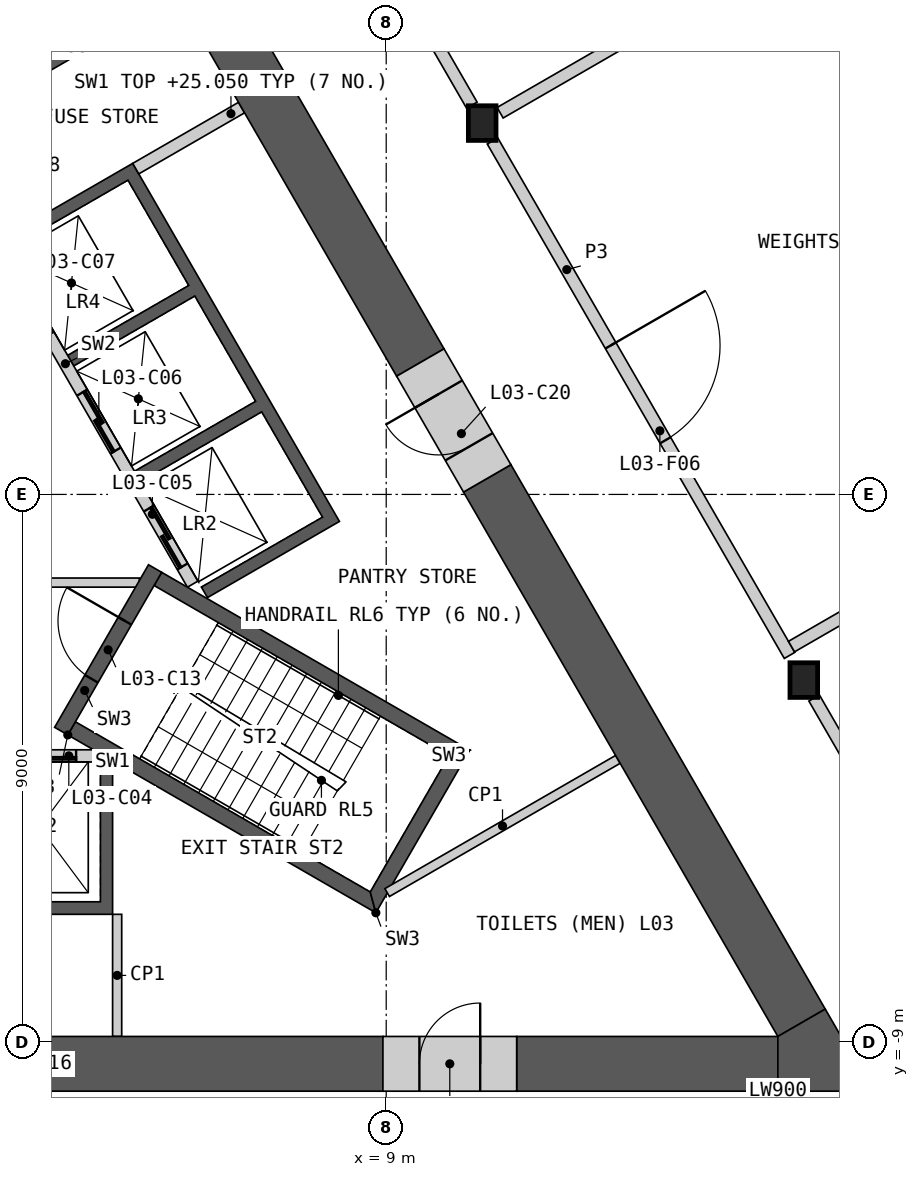
"""IFC4 building model, lengths in metres.
Left out: names, types, materials, properties, quantities, classifications, styles, units other than length and angle.
Written with IfcOpenShell. Run it as: python <this file> out.ifc"""

import sys

from ifc_helpers import new_model, si_unit, direction, frame, frame_2d, origin, origin_2d, place, context, subcontext, project, spatial, polyline, rectangle, i_section, outline, extrude, element, fill, save


model = new_model("IFC4")
c1 = context("Model", 3, precision=1e-05, world=origin(), true_north=direction((0.0, 1.0)))
c2 = subcontext(c1, "Body", "Model", "MODEL_VIEW")
j1 = project(units=[si_unit("LENGTHUNIT", "METRE"), si_unit("PLANEANGLEUNIT", "RADIAN")], contexts=[c1])
p1 = place(None, origin())
s1 = spatial("IfcSite", under=j1, at=p1, CompositionType="ELEMENT")
p2 = place(p1, origin())
s2 = spatial("IfcBuilding", under=s1, at=p2, CompositionType="ELEMENT")
p3 = place(p2, frame((0.0, 0.0, 21.0)))
s3 = spatial("IfcBuildingStorey", under=s2, at=p3, CompositionType="ELEMENT", Elevation=21.0)
for number, where, z_axis, x_axis in (
    (1, (15.868, -3.054, 0.0), (0.0, 0.0, 1.0), (1.0, 0.0, 0.0)),
    (2, (10.578, 6.107, 0.0), (0.0, 0.0, 1.0), (1.0, 0.0, 0.0)),
):
    element("IfcColumn", number, at=place(p3, frame(where, z_axis=z_axis, x_axis=x_axis)), inside=s3, PredefinedType="COLUMN", context=c2, shape_type="SweptSolid", body=[
        extrude(i_section(OverallWidth=0.454, OverallDepth=0.57, WebThickness=0.078, FlangeThickness=0.125, at=origin_2d()), origin(), (0.0, 0.0, 1.0), 4.5),
    ])
p4 = place(p3, origin())
e3 = element("IfcWall", 3, at=p4, inside=s3, PredefinedType="SHEAR", context=c2, shape_type="SweptSolid", body=[
    extrude(outline(polyline([(4.5, -4.4), (4.5, -6.906), (-4.5, -6.906), (-4.5, -4.4), (-4.3, -4.4), (-4.3, -6.7), (-2.3, -6.7), (-2.3, -4.4), (-2.1, -4.4), (-2.1, -6.7), (-0.1, -6.7), (-0.1, -4.4), (0.1, -4.4), (0.1, -6.7), (2.1, -6.7), (2.1, -4.4), (2.3, -4.4), (2.3, -6.7), (4.3, -6.7), (4.3, -4.4), (4.5, -4.4)])), origin(), (0.0, 0.0, 1.0), 4.05),
])
p5 = place(p3, frame((-4.187, -4.3, 0.0), z_axis=(0.0, 0.0, 1.0), x_axis=(1.0, 0.0, 0.0)))
e4 = element("IfcWall", 4, at=p5, inside=s3, PredefinedType="SOLIDWALL", context=c2, shape_type="SweptSolid", body=[
    extrude(rectangle(XDim=8.373, YDim=0.2, at=frame_2d((4.187, 0.0))), origin(), (0.0, 0.0, 1.0), 4.05),
])
p6 = place(p5, frame((0.287, 0.0, 0.0)))
e5 = element("IfcOpeningElement", 5, at=p6, cuts=e4, PredefinedType="OPENING", context=c2, shape_type="SweptSolid", body=[
    extrude(rectangle(XDim=1.2, YDim=2.1, at=frame_2d((0.6, 1.05))), frame((0.0, 0.11, 0.0), z_axis=(0.0, -1.0, 0.0), x_axis=(1.0, 0.0, 0.0)), (0.0, 0.0, 1.0), 0.22),
])
p7 = place(p5, frame((2.387, 0.0, 0.0)))
e6 = element("IfcOpeningElement", 6, at=p7, cuts=e4, PredefinedType="OPENING", context=c2, shape_type="SweptSolid", body=[
    extrude(rectangle(XDim=1.4, YDim=2.1, at=frame_2d((0.7, 1.05))), frame((0.0, 0.11, 0.0), z_axis=(0.0, -1.0, 0.0), x_axis=(1.0, 0.0, 0.0)), (0.0, 0.0, 1.0), 0.22),
])
p8 = place(p5, frame((4.737, 0.0, 0.0)))
e7 = element("IfcOpeningElement", 7, at=p8, cuts=e4, PredefinedType="OPENING", context=c2, shape_type="SweptSolid", body=[
    extrude(rectangle(XDim=1.1, YDim=2.1, at=frame_2d((0.55, 1.05))), frame((0.0, 0.11, 0.0), z_axis=(0.0, -1.0, 0.0), x_axis=(1.0, 0.0, 0.0)), (0.0, 0.0, 1.0), 0.22),
])
p9 = place(p5, frame((6.887, 0.0, 0.0)))
e8 = element("IfcOpeningElement", 8, at=p9, cuts=e4, PredefinedType="OPENING", context=c2, shape_type="SweptSolid", body=[
    extrude(rectangle(XDim=1.2, YDim=2.1, at=frame_2d((0.6, 1.05))), frame((0.0, 0.11, 0.0), z_axis=(0.0, -1.0, 0.0), x_axis=(1.0, 0.0, 0.0)), (0.0, 0.0, 1.0), 0.22),
])
p10 = place(p3, origin())
e9 = element("IfcWall", 9, at=p10, inside=s3, PredefinedType="SHEAR", context=c2, shape_type="SweptSolid", body=[
    extrude(outline(polyline([(1.561, 6.097), (3.731, 7.35), (3.831, 7.177), (1.66, 5.924), (1.561, 6.097)])), origin(), (0.0, 0.0, 1.0), 4.05),
])
p11 = place(p3, origin())
e10 = element("IfcWall", 10, at=p11, inside=s3, PredefinedType="SHEAR", context=c2, shape_type="SweptSolid", body=[
    extrude(outline(polyline([(2.66, 4.192), (4.831, 5.445), (8.231, -0.444), (6.061, -1.697), (5.96, -1.524), (7.952, -0.374), (6.952, 1.358), (4.96, 0.208), (4.861, 0.381), (6.852, 1.531), (5.852, 3.263), (3.861, 2.113), (3.76, 2.287), (5.752, 3.437), (4.752, 5.169), (2.76, 4.019), (2.66, 4.192)])), origin(), (0.0, 0.0, 1.0), 4.05),
])
p12 = place(p3, frame((5.817, -1.476, 0.0), z_axis=(0.0, 0.0, 1.0), x_axis=(-0.500002616675, 0.866023893041, 0.0)))
e11 = element("IfcWall", 11, at=p12, inside=s3, PredefinedType="SOLIDWALL", context=c2, shape_type="SweptSolid", body=[
    extrude(rectangle(XDim=8.373, YDim=0.2, at=frame_2d((4.187, 0.0))), origin(), (0.0, 0.0, 1.0), 4.05),
])
p13 = place(p12, frame((0.337, 0.0, 0.0)))
e12 = element("IfcOpeningElement", 12, at=p13, cuts=e11, PredefinedType="OPENING", context=c2, shape_type="SweptSolid", body=[
    extrude(rectangle(XDim=1.1, YDim=2.1, at=frame_2d((0.55, 1.05))), frame((0.0, 0.11, 0.0), z_axis=(0.0, -1.0, 0.0), x_axis=(1.0, 0.0, 0.0)), (0.0, 0.0, 1.0), 0.22),
])
p14 = place(p12, frame((2.537, 0.0, 0.0)))
e13 = element("IfcOpeningElement", 13, at=p14, cuts=e11, PredefinedType="OPENING", context=c2, shape_type="SweptSolid", body=[
    extrude(rectangle(XDim=1.1, YDim=2.1, at=frame_2d((0.55, 1.05))), frame((0.0, 0.11, 0.0), z_axis=(0.0, -1.0, 0.0), x_axis=(1.0, 0.0, 0.0)), (0.0, 0.0, 1.0), 0.22),
])
p15 = place(p12, frame((4.737, 0.0, 0.0)))
e14 = element("IfcOpeningElement", 14, at=p15, cuts=e11, PredefinedType="OPENING", context=c2, shape_type="SweptSolid", body=[
    extrude(rectangle(XDim=1.1, YDim=2.1, at=frame_2d((0.55, 1.05))), frame((0.0, 0.11, 0.0), z_axis=(0.0, -1.0, 0.0), x_axis=(1.0, 0.0, 0.0)), (0.0, 0.0, 1.0), 0.22),
])
p16 = place(p12, frame((7.037, 0.0, 0.0)))
e15 = element("IfcOpeningElement", 15, at=p16, cuts=e11, PredefinedType="OPENING", context=c2, shape_type="SweptSolid", body=[
    extrude(rectangle(XDim=0.9, YDim=2.1, at=frame_2d((0.45, 1.05))), frame((0.0, 0.11, 0.0), z_axis=(0.0, -1.0, 0.0), x_axis=(1.0, 0.0, 0.0)), (0.0, 0.0, 1.0), 0.22),
])
p17 = place(p3, frame((4.881, 5.358, 0.0), z_axis=(0.0, 0.0, 1.0), x_axis=(0.866035824272, 0.499981950752, 0.0)))
e16 = element("IfcWall", 16, at=p17, inside=s3, PredefinedType="SHEAR", context=c2, shape_type="SweptSolid", body=[
    extrude(rectangle(XDim=2.009, YDim=0.2, at=frame_2d((1.004, 0.0))), origin(), (0.0, 0.0, 1.0), 4.05),
])
p18 = place(p3, frame((3.781, 7.263, 0.0), z_axis=(0.0, 0.0, 1.0), x_axis=(0.865983199114, 0.50007309351, 0.0)))
e17 = element("IfcWall", 17, at=p18, inside=s3, PredefinedType="SHEAR", context=c2, shape_type="SweptSolid", body=[
    extrude(rectangle(XDim=2.009, YDim=0.2, at=frame_2d((1.004, 0.0))), origin(), (0.0, 0.0, 1.0), 4.05),
])
p19 = place(p3, frame((-4.941, -1.45, 0.0), z_axis=(0.0, 0.0, 1.0), x_axis=(1.0, 0.0, 0.0)))
e18 = element("IfcWall", 18, at=p19, inside=s3, PredefinedType="PARTITIONING", context=c2, shape_type="SweptSolid", body=[
    extrude(rectangle(XDim=9.882, YDim=0.15, at=frame_2d((4.941, 0.0))), origin(), (0.0, 0.0, 1.0), 4.05),
])
p20 = place(p19, frame((4.391, 0.0, 0.0)))
e19 = element("IfcOpeningElement", 19, at=p20, cuts=e18, PredefinedType="OPENING", context=c2, shape_type="SweptSolid", body=[
    extrude(rectangle(XDim=1.1, YDim=2.1, at=frame_2d((0.55, 1.05))), frame((0.0, 0.085, 0.0), z_axis=(0.0, -1.0, 0.0), x_axis=(1.0, 0.0, 0.0)), (0.0, 0.0, 1.0), 0.17),
])
p21 = place(p3, origin())
e20 = element("IfcWall", 20, at=p21, inside=s3, PredefinedType="SHEAR", context=c2, shape_type="SweptSolid", body=[
    extrude(outline(polyline([(3.763, -3.956), (8.83, -6.881), (8.738, -6.539), (3.888, -3.739), (3.763, -3.956)])), origin(), (0.0, 0.0, 1.0), 4.05),
])
p22 = place(p3, origin())
e21 = element("IfcWall", 21, at=p22, inside=s3, PredefinedType="SHEAR", context=c2, shape_type="SweptSolid", body=[
    extrude(outline(polyline([(8.83, -6.881), (10.374, -4.206), (10.032, -4.298), (8.738, -6.539), (8.83, -6.881)])), origin(), (0.0, 0.0, 1.0), 4.05),
])
p23 = place(p3, origin())
e22 = element("IfcWall", 22, at=p23, inside=s3, PredefinedType="SHEAR", context=c2, shape_type="SweptSolid", body=[
    extrude(outline(polyline([(10.032, -4.298), (10.374, -4.206), (5.307, -1.281), (5.182, -1.498), (10.032, -4.298)])), origin(), (0.0, 0.0, 1.0), 4.05),
])
p24 = place(p3, frame((3.655, -3.893, 0.0), z_axis=(0.0, 0.0, 1.0), x_axis=(0.499982516597, 0.866035497597, 0.0)))
e23 = element("IfcWall", 23, at=p24, inside=s3, PredefinedType="SHEAR", context=c2, shape_type="SweptSolid", body=[
    extrude(rectangle(XDim=3.088, YDim=0.25, at=frame_2d((1.544, 0.0))), origin(), (0.0, 0.0, 1.0), 4.05),
])
p25 = place(p24, frame((0.994, 0.0, 0.0)))
e24 = element("IfcOpeningElement", 24, at=p25, cuts=e23, PredefinedType="OPENING", context=c2, shape_type="SweptSolid", body=[
    extrude(rectangle(XDim=1.1, YDim=2.1, at=frame_2d((0.55, 1.05))), frame((0.0, 0.135, 0.0), z_axis=(0.0, -1.0, 0.0), x_axis=(1.0, 0.0, 0.0)), (0.0, 0.0, 1.0), 0.27),
])
p26 = place(p3, frame((4.575, -6.906, 0.0), z_axis=(0.0, 0.0, 1.0), x_axis=(0.0, -1.0, 0.0)))
e25 = element("IfcWall", 25, at=p26, inside=s3, PredefinedType="PARTITIONING", context=c2, shape_type="SweptSolid", body=[
    extrude(rectangle(XDim=2.009, YDim=0.15, at=frame_2d((1.004, 0.0))), origin(), (0.0, 0.0, 1.0), 4.05),
])
p27 = place(p3, frame((12.81, -4.358, 0.0), z_axis=(0.0, 0.0, 1.0), x_axis=(-0.866043624834, -0.499968438888, 0.0)))
e26 = element("IfcWall", 26, at=p27, inside=s3, PredefinedType="PARTITIONING", context=c2, shape_type="SweptSolid", body=[
    extrude(rectangle(XDim=4.382, YDim=0.15, at=frame_2d((2.191, 0.0))), origin(), (0.0, 0.0, 1.0), 4.05),
])
p28 = place(p3, frame((2.488, -9.365, 0.0), z_axis=(0.0, 0.0, 1.0), x_axis=(1.0, 0.0, 0.0)))
e27 = element("IfcWall", 27, at=p28, inside=s3, PredefinedType="SHEAR", context=c2, shape_type="SweptSolid", body=[
    extrude(rectangle(XDim=6.458, YDim=0.9, at=frame_2d((3.229, 0.0))), origin(), (0.0, 0.0, 1.0), 4.05),
])
p29 = place(p3, frame((11.146, -9.365, 0.0), z_axis=(0.0, 0.0, 1.0), x_axis=(1.0, 0.0, 0.0)))
e28 = element("IfcWall", 28, at=p29, inside=s3, PredefinedType="SHEAR", context=c2, shape_type="SweptSolid", body=[
    extrude(rectangle(XDim=4.296, YDim=0.9, at=frame_2d((2.148, 0.0))), origin(), (0.0, 0.0, 1.0), 4.05),
])
p30 = place(p3, frame((15.831, -8.69, 0.0), z_axis=(0.0, 0.0, 1.0), x_axis=(-0.500001798008, 0.866024365702, 0.0)))
e29 = element("IfcWall", 29, at=p30, inside=s3, PredefinedType="SHEAR", context=c2, shape_type="SweptSolid", body=[
    extrude(rectangle(XDim=10.339, YDim=0.9, at=frame_2d((5.17, 0.0))), origin(), (0.0, 0.0, 1.0), 4.05),
])
p31 = place(p3, frame((9.561, 2.169, 0.0), z_axis=(0.0, 0.0, 1.0), x_axis=(-0.499995114243, 0.866028224559, 0.0)))
e30 = element("IfcWall", 30, at=p31, inside=s3, PredefinedType="SHEAR", context=c2, shape_type="SweptSolid", body=[
    extrude(rectangle(XDim=7.906, YDim=0.9, at=frame_2d((3.953, 0.0))), origin(), (0.0, 0.0, 1.0), 4.05),
])
p32 = place(p3, origin())
e31 = element("IfcWall", 31, at=p32, inside=s3, PredefinedType="SHEAR", context=c2, shape_type="SweptSolid", body=[
    extrude(outline(polyline([(15.441, -9.815), (15.441, -8.915), (16.221, -8.465), (17.0, -9.815), (15.441, -9.815)])), origin(), (0.0, 0.0, 1.0), 4.05),
])
p33 = place(p3, frame((8.946, -9.365, 0.0), z_axis=(0.0, 0.0, 1.0), x_axis=(1.0, 0.0, 0.0)))
e32 = element("IfcWall", 32, at=p33, inside=s3, PredefinedType="SHEAR", context=c2, shape_type="SweptSolid", body=[
    extrude(rectangle(XDim=2.2, YDim=0.9, at=frame_2d((1.1, 0.0))), origin(), (0.0, 0.0, 1.0), 4.05),
])
p34 = place(p33, frame((0.6, 0.0, 0.0)))
e33 = element("IfcOpeningElement", 33, at=p34, cuts=e32, PredefinedType="OPENING", context=c2, shape_type="SweptSolid", body=[
    extrude(rectangle(XDim=1.0, YDim=2.1, at=frame_2d((0.5, 1.05))), frame((0.0, 0.46, 0.0), z_axis=(0.0, -1.0, 0.0), x_axis=(1.0, 0.0, 0.0)), (0.0, 0.0, 1.0), 0.92),
])
p35 = place(p3, frame((10.661, 0.264, 0.0), z_axis=(0.0, 0.0, 1.0), x_axis=(-0.500077893725, 0.86598042715, 0.0)))
e34 = element("IfcWall", 34, at=p35, inside=s3, PredefinedType="SHEAR", context=c2, shape_type="SweptSolid", body=[
    extrude(rectangle(XDim=2.2, YDim=0.9, at=frame_2d((1.1, 0.0))), origin(), (0.0, 0.0, 1.0), 4.05),
])
p36 = place(p35, frame((0.6, 0.0, 0.0)))
e35 = element("IfcOpeningElement", 35, at=p36, cuts=e34, PredefinedType="OPENING", context=c2, shape_type="SweptSolid", body=[
    extrude(rectangle(XDim=1.0, YDim=2.1, at=frame_2d((0.5, 1.05))), frame((0.0, 0.46, 0.0), z_axis=(0.0, -1.0, 0.0), x_axis=(1.0, 0.0, 0.0)), (0.0, 0.0, 1.0), 0.92),
])
p37 = place(p3, frame((5.459, 14.974, 0.0), z_axis=(0.0, 0.0, 1.0), x_axis=(0.499985793049, -0.866033606016, 0.0)))
e36 = element("IfcWall", 36, at=p37, inside=s3, PredefinedType="PARTITIONING", context=c2, shape_type="SweptSolid", body=[
    extrude(rectangle(XDim=9.898, YDim=0.2, at=frame_2d((4.949, 0.0))), origin(), (0.0, 0.0, 1.0), 4.05),
])
p38 = place(p37, frame((3.998, 0.0, 0.0)))
e37 = element("IfcOpeningElement", 37, at=p38, cuts=e36, PredefinedType="OPENING", context=c2, shape_type="SweptSolid", body=[
    extrude(rectangle(XDim=1.8, YDim=2.1, at=frame_2d((0.9, 1.05))), frame((0.0, 0.11, 0.0), z_axis=(0.0, -1.0, 0.0), x_axis=(1.0, 0.0, 0.0)), (0.0, 0.0, 1.0), 0.22),
])
p39 = place(p3, frame((10.749, 5.813, 0.0), z_axis=(0.0, 0.0, 1.0), x_axis=(0.500017363087, -0.866015378969, 0.0)))
e38 = element("IfcWall", 38, at=p39, inside=s3, PredefinedType="PARTITIONING", context=c2, shape_type="SweptSolid", body=[
    extrude(rectangle(XDim=9.77, YDim=0.2, at=frame_2d((4.885, 0.0))), origin(), (0.0, 0.0, 1.0), 4.05),
])
p40 = place(p39, frame((3.884, 0.0, 0.0)))
e39 = element("IfcOpeningElement", 39, at=p40, cuts=e38, PredefinedType="OPENING", context=c2, shape_type="SweptSolid", body=[
    extrude(rectangle(XDim=1.8, YDim=2.1, at=frame_2d((0.9, 1.05))), frame((0.0, 0.11, 0.0), z_axis=(0.0, -1.0, 0.0), x_axis=(1.0, 0.0, 0.0)), (0.0, 0.0, 1.0), 0.22),
])
p41 = place(p3, frame((16.038, -3.348, 0.0), z_axis=(0.0, 0.0, 1.0), x_axis=(0.499988314375, -0.866032150378, 0.0)))
e40 = element("IfcWall", 40, at=p41, inside=s3, PredefinedType="PARTITIONING", context=c2, shape_type="SweptSolid", body=[
    extrude(rectangle(XDim=6.412, YDim=0.2, at=frame_2d((3.206, 0.0))), origin(), (0.0, 0.0, 1.0), 4.05),
])
p42 = place(p41, frame((2.656, 0.0, 0.0)))
e41 = element("IfcOpeningElement", 41, at=p42, cuts=e40, PredefinedType="OPENING", context=c2, shape_type="SweptSolid", body=[
    extrude(rectangle(XDim=1.0, YDim=2.1, at=frame_2d((0.5, 1.05))), frame((0.0, 0.11, 0.0), z_axis=(0.0, -1.0, 0.0), x_axis=(1.0, 0.0, 0.0)), (0.0, 0.0, 1.0), 0.22),
])
p43 = place(p3, frame((15.665, -2.503, 0.0), z_axis=(0.0, 0.0, 1.0), x_axis=(0.866034070548, 0.499984988425, 0.0)))
e42 = element("IfcWall", 42, at=p43, inside=s3, PredefinedType="PARTITIONING", context=c2, shape_type="SweptSolid", body=[
    extrude(rectangle(XDim=9.982, YDim=0.2, at=frame_2d((4.991, 0.0))), origin(), (0.0, 0.0, 1.0), 4.05),
])
p44 = place(p3, frame((10.873, 6.278, 0.0), z_axis=(0.0, 0.0, 1.0), x_axis=(0.866029077831, 0.499993636311, 0.0)))
e43 = element("IfcWall", 43, at=p44, inside=s3, PredefinedType="PARTITIONING", context=c2, shape_type="SweptSolid", body=[
    extrude(rectangle(XDim=9.741, YDim=0.2, at=frame_2d((4.871, 0.0))), origin(), (0.0, 0.0, 1.0), 4.05),
])
p45 = place(p9, origin())
e44 = element("IfcDoor", 44, at=p45, inside=s3, OperationType="SLIDING_TO_LEFT", PredefinedType="DOOR", context=c2, shape_type="SweptSolid", body=[
    extrude(rectangle(XDim=1.2, YDim=2.1, at=frame_2d((0.6, 1.05))), frame((0.0, 0.025, 0.0), z_axis=(0.0, -1.0, 0.0), x_axis=(1.0, 0.0, 0.0)), (0.0, 0.0, 1.0), 0.05),
])
fill(e8, e44)
p46 = place(p13, origin())
e45 = element("IfcDoor", 45, at=p46, inside=s3, OperationType="SLIDING_TO_LEFT", PredefinedType="DOOR", context=c2, shape_type="SweptSolid", body=[
    extrude(rectangle(XDim=1.1, YDim=2.1, at=frame_2d((0.55, 1.05))), frame((0.0, 0.025, 0.0), z_axis=(0.0, -1.0, 0.0), x_axis=(1.0, 0.0, 0.0)), (0.0, 0.0, 1.0), 0.05),
])
fill(e12, e45)
p47 = place(p14, origin())
e46 = element("IfcDoor", 46, at=p47, inside=s3, OperationType="SLIDING_TO_LEFT", PredefinedType="DOOR", context=c2, shape_type="SweptSolid", body=[
    extrude(rectangle(XDim=1.1, YDim=2.1, at=frame_2d((0.55, 1.05))), frame((0.0, 0.025, 0.0), z_axis=(0.0, -1.0, 0.0), x_axis=(1.0, 0.0, 0.0)), (0.0, 0.0, 1.0), 0.05),
])
fill(e13, e46)
p48 = place(p25, origin())
e47 = element("IfcDoor", 47, at=p48, inside=s3, OperationType="SINGLE_SWING_RIGHT", PredefinedType="DOOR", context=c2, shape_type="SweptSolid", body=[
    extrude(rectangle(XDim=1.1, YDim=2.1, at=frame_2d((0.55, 1.05))), frame((0.0, 0.025, 0.0), z_axis=(0.0, -1.0, 0.0), x_axis=(1.0, 0.0, 0.0)), (0.0, 0.0, 1.0), 0.05),
])
fill(e24, e47)
p49 = place(p34, origin())
e48 = element("IfcDoor", 48, at=p49, inside=s3, OperationType="SINGLE_SWING_RIGHT", PredefinedType="DOOR", context=c2, shape_type="SweptSolid", body=[
    extrude(rectangle(XDim=1.0, YDim=2.1, at=frame_2d((0.5, 1.05))), frame((0.0, 0.205, 0.0), z_axis=(0.0, -1.0, 0.0), x_axis=(1.0, 0.0, 0.0)), (0.0, 0.0, 1.0), 0.05),
])
fill(e33, e48)
p50 = place(p36, origin())
e49 = element("IfcDoor", 49, at=p50, inside=s3, OperationType="SINGLE_SWING_RIGHT", PredefinedType="DOOR", context=c2, shape_type="SweptSolid", body=[
    extrude(rectangle(XDim=1.0, YDim=2.1, at=frame_2d((0.5, 1.05))), frame((0.0, 0.205, 0.0), z_axis=(0.0, -1.0, 0.0), x_axis=(1.0, 0.0, 0.0)), (0.0, 0.0, 1.0), 0.05),
])
fill(e35, e49)
p51 = place(p40, origin())
e50 = element("IfcDoor", 50, at=p51, inside=s3, OperationType="DOUBLE_DOOR_SINGLE_SWING", PredefinedType="DOOR", context=c2, shape_type="SweptSolid", body=[
    extrude(rectangle(XDim=1.8, YDim=2.1, at=frame_2d((0.9, 1.05))), frame((0.0, 0.025, 0.0), z_axis=(0.0, -1.0, 0.0), x_axis=(1.0, 0.0, 0.0)), (0.0, 0.0, 1.0), 0.05),
])
fill(e39, e50)
save(model, sys.argv[1])
